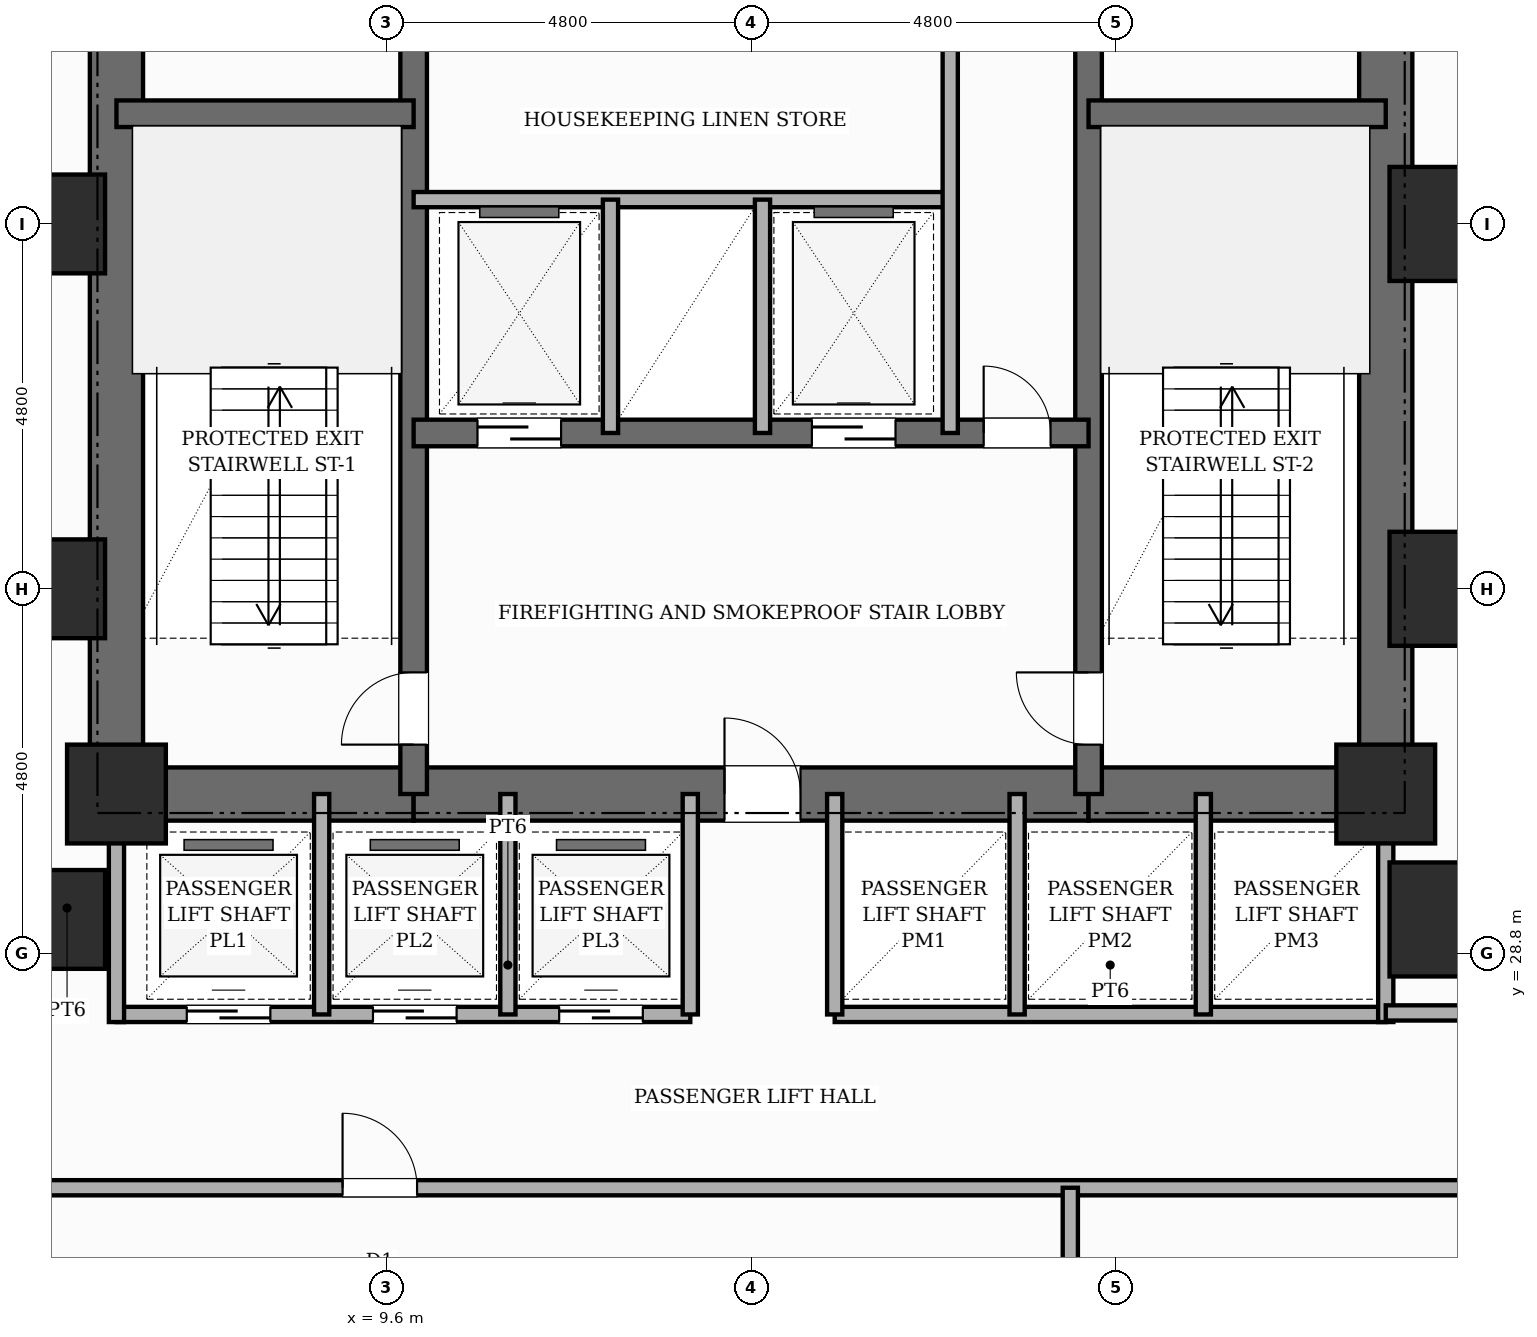
"""IFC4 building model, lengths in metres.
Left out: names, types, materials, properties, quantities, classifications, styles, units other than length and angle.
Written with IfcOpenShell. Run it as: python <this file> out.ifc"""

import sys

from ifc_helpers import new_model, si_unit, direction, frame, frame_2d, origin, origin_2d, place, context, subcontext, project, spatial, rectangle, extrude, element, fill, save


model = new_model("IFC4")
c1 = context("Model", 3, precision=1e-05, world=origin(), true_north=direction((0.0, 1.0)))
c2 = subcontext(c1, "Body", "Model", "MODEL_VIEW")
j1 = project(units=[si_unit("LENGTHUNIT", "METRE"), si_unit("PLANEANGLEUNIT", "RADIAN")], contexts=[c1])
p1 = place(None, origin())
s1 = spatial("IfcSite", under=j1, at=p1, CompositionType="ELEMENT")
p2 = place(p1, origin())
s2 = spatial("IfcBuilding", under=s1, at=p2, CompositionType="ELEMENT")
p3 = place(p2, frame((0.0, 0.0, 14.8)))
s3 = spatial("IfcBuildingStorey", under=s2, at=p3, CompositionType="ELEMENT", Elevation=14.8)
p4 = place(p3, frame((6.05, 30.55, 0.0), z_axis=(0.0, 0.0, 1.0), x_axis=(0.0, 1.0, 0.0)))
e1 = element("IfcWall", 1, at=p4, inside=s3, PredefinedType="SHEAR", context=c2, shape_type="SweptSolid", body=[
    extrude(rectangle(XDim=15.6, YDim=0.7, at=frame_2d((7.8, 0.0))), origin(), (0.0, 0.0, 1.0), 4.8),
])
p5 = place(p3, frame((22.75, 30.55, 0.0), z_axis=(0.0, 0.0, 1.0), x_axis=(0.0, 1.0, 0.0)))
e2 = element("IfcWall", 2, at=p5, inside=s3, PredefinedType="SHEAR", context=c2, shape_type="SweptSolid", body=[
    extrude(rectangle(XDim=15.6, YDim=0.7, at=frame_2d((7.8, 0.0))), origin(), (0.0, 0.0, 1.0), 4.8),
])
p6 = place(p5, frame((10.8, 0.0, 0.0)))
e3 = element("IfcOpeningElement", 3, at=p6, cuts=e2, PredefinedType="OPENING", context=c2, shape_type="SweptSolid", body=[
    extrude(rectangle(XDim=1.0, YDim=2.15, at=frame_2d((0.5, 1.075))), frame((0.0, 0.36, 0.0), z_axis=(0.0, -1.0, 0.0), x_axis=(1.0, 0.0, 0.0)), (0.0, 0.0, 1.0), 0.72),
])
p7 = place(p3, frame((6.05, 30.9, 0.0), z_axis=(0.0, 0.0, 1.0), x_axis=(1.0, 0.0, 0.0)))
e4 = element("IfcWall", 4, at=p7, inside=s3, PredefinedType="SHEAR", context=c2, shape_type="SweptSolid", body=[
    extrude(rectangle(XDim=3.91, YDim=0.7, at=frame_2d((1.955, 0.0))), origin(), (0.0, 0.0, 1.0), 4.8),
])
p8 = place(p3, frame((9.96, 30.9, 0.0), z_axis=(0.0, 0.0, 1.0), x_axis=(1.0, 0.0, 0.0)))
e5 = element("IfcWall", 5, at=p8, inside=s3, PredefinedType="SHEAR", context=c2, shape_type="SweptSolid", body=[
    extrude(rectangle(XDim=8.88, YDim=0.7, at=frame_2d((4.44, 0.0))), origin(), (0.0, 0.0, 1.0), 4.8),
])
p9 = place(p8, frame((4.09, 0.0, 0.0)))
e6 = element("IfcOpeningElement", 6, at=p9, cuts=e5, PredefinedType="OPENING", context=c2, shape_type="SweptSolid", body=[
    extrude(rectangle(XDim=1.0, YDim=2.15, at=frame_2d((0.5, 1.075))), frame((0.0, 0.36, 0.0), z_axis=(0.0, -1.0, 0.0), x_axis=(1.0, 0.0, 0.0)), (0.0, 0.0, 1.0), 0.72),
])
p10 = place(p3, frame((18.84, 30.9, 0.0), z_axis=(0.0, 0.0, 1.0), x_axis=(1.0, 0.0, 0.0)))
e7 = element("IfcWall", 7, at=p10, inside=s3, PredefinedType="SHEAR", context=c2, shape_type="SweptSolid", body=[
    extrude(rectangle(XDim=3.91, YDim=0.7, at=frame_2d((1.955, 0.0))), origin(), (0.0, 0.0, 1.0), 4.8),
])
p11 = place(p3, frame((9.96, 30.9, 0.0), z_axis=(0.0, 0.0, 1.0), x_axis=(0.0, 1.0, 0.0)))
e8 = element("IfcWall", 8, at=p11, inside=s3, PredefinedType="SHEAR", context=c2, shape_type="SweptSolid", body=[
    extrude(rectangle(XDim=14.9, YDim=0.35, at=frame_2d((7.45, 0.0))), origin(), (0.0, 0.0, 1.0), 4.8),
])
p12 = place(p11, frame((0.65, 0.0, 0.0)))
e9 = element("IfcOpeningElement", 9, at=p12, cuts=e8, PredefinedType="OPENING", context=c2, shape_type="SweptSolid", body=[
    extrude(rectangle(XDim=0.95, YDim=2.1, at=frame_2d((0.475, 1.05))), frame((0.0, 0.185, 0.0), z_axis=(0.0, -1.0, 0.0), x_axis=(1.0, 0.0, 0.0)), (0.0, 0.0, 1.0), 0.37),
])
p13 = place(p11, frame((10.45, 0.0, 0.0)))
e10 = element("IfcOpeningElement", 10, at=p13, cuts=e8, PredefinedType="OPENING", context=c2, shape_type="SweptSolid", body=[
    extrude(rectangle(XDim=1.0, YDim=2.15, at=frame_2d((0.5, 1.075))), frame((0.0, 0.185, 0.0), z_axis=(0.0, -1.0, 0.0), x_axis=(1.0, 0.0, 0.0)), (0.0, 0.0, 1.0), 0.37),
])
p14 = place(p3, frame((18.84, 30.9, 0.0), z_axis=(0.0, 0.0, 1.0), x_axis=(0.0, 1.0, 0.0)))
e11 = element("IfcWall", 11, at=p14, inside=s3, PredefinedType="SHEAR", context=c2, shape_type="SweptSolid", body=[
    extrude(rectangle(XDim=14.9, YDim=0.35, at=frame_2d((7.45, 0.0))), origin(), (0.0, 0.0, 1.0), 4.8),
])
p15 = place(p14, frame((0.65, 0.0, 0.0)))
e12 = element("IfcOpeningElement", 12, at=p15, cuts=e11, PredefinedType="OPENING", context=c2, shape_type="SweptSolid", body=[
    extrude(rectangle(XDim=0.95, YDim=2.1, at=frame_2d((0.475, 1.05))), frame((0.0, 0.185, 0.0), z_axis=(0.0, -1.0, 0.0), x_axis=(1.0, 0.0, 0.0)), (0.0, 0.0, 1.0), 0.37),
])
p16 = place(p14, frame((10.45, 0.0, 0.0)))
e13 = element("IfcOpeningElement", 13, at=p16, cuts=e11, PredefinedType="OPENING", context=c2, shape_type="SweptSolid", body=[
    extrude(rectangle(XDim=1.0, YDim=2.15, at=frame_2d((0.5, 1.075))), frame((0.0, 0.185, 0.0), z_axis=(0.0, -1.0, 0.0), x_axis=(1.0, 0.0, 0.0)), (0.0, 0.0, 1.0), 0.37),
])
for number, where, z_axis, x_axis in (
    (14, (6.05, 39.85, 0.0), (0.0, 0.0, 1.0), (1.0, 0.0, 0.0)),
    (15, (18.84, 39.85, 0.0), (0.0, 0.0, 1.0), (1.0, 0.0, 0.0)),
):
    element("IfcWall", number, at=place(p3, frame(where, z_axis=z_axis, x_axis=x_axis)), inside=s3, PredefinedType="SHEAR", context=c2, shape_type="SweptSolid", body=[
        extrude(rectangle(XDim=3.91, YDim=0.35, at=frame_2d((1.955, 0.0))), origin(), (0.0, 0.0, 1.0), 4.8),
    ])
p17 = place(p3, frame((9.96, 35.65, 0.0), z_axis=(0.0, 0.0, 1.0), x_axis=(1.0, 0.0, 0.0)))
e16 = element("IfcWall", 16, at=p17, inside=s3, PredefinedType="SHEAR", context=c2, shape_type="SweptSolid", body=[
    extrude(rectangle(XDim=8.88, YDim=0.35, at=frame_2d((4.44, 0.0))), origin(), (0.0, 0.0, 1.0), 4.8),
])
p18 = place(p17, frame((0.84, 0.0, 0.0)))
e17 = element("IfcOpeningElement", 17, at=p18, cuts=e16, PredefinedType="OPENING", context=c2, shape_type="SweptSolid", body=[
    extrude(rectangle(XDim=1.1, YDim=2.15, at=frame_2d((0.55, 1.075))), frame((0.0, 0.185, 0.0), z_axis=(0.0, -1.0, 0.0), x_axis=(1.0, 0.0, 0.0)), (0.0, 0.0, 1.0), 0.37),
])
p19 = place(p17, frame((5.24, 0.0, 0.0)))
e18 = element("IfcOpeningElement", 18, at=p19, cuts=e16, PredefinedType="OPENING", context=c2, shape_type="SweptSolid", body=[
    extrude(rectangle(XDim=1.1, YDim=2.15, at=frame_2d((0.55, 1.075))), frame((0.0, 0.185, 0.0), z_axis=(0.0, -1.0, 0.0), x_axis=(1.0, 0.0, 0.0)), (0.0, 0.0, 1.0), 0.37),
])
p20 = place(p17, frame((7.5, 0.0, 0.0)))
e19 = element("IfcOpeningElement", 19, at=p20, cuts=e16, PredefinedType="OPENING", context=c2, shape_type="SweptSolid", body=[
    extrude(rectangle(XDim=0.88, YDim=2.1, at=frame_2d((0.44, 1.05))), frame((0.0, 0.185, 0.0), z_axis=(0.0, -1.0, 0.0), x_axis=(1.0, 0.0, 0.0)), (0.0, 0.0, 1.0), 0.37),
])
for number, where, z_axis, x_axis in (
    (20, (5.25, 29.25, 0.0), (0.0, 0.0, 1.0), (1.0, 0.0, 0.0)),
    (21, (5.25, 33.6, 0.0), (0.0, 0.0, 1.0), (1.0, 0.0, 0.0)),
    (22, (5.25, 38.4, 0.0), (0.0, 0.0, 1.0), (1.0, 0.0, 0.0)),
    (23, (6.05, 30.9, 0.0), (0.0, 0.0, 1.0), (1.0, 0.0, 0.0)),
    (24, (22.75, 30.9, 0.0), (0.0, 0.0, 1.0), (1.0, 0.0, 0.0)),
):
    element("IfcColumn", number, at=place(p3, frame(where, z_axis=z_axis, x_axis=x_axis)), inside=s3, PredefinedType="COLUMN", context=c2, shape_type="SweptSolid", body=[
        extrude(rectangle(XDim=1.3, YDim=1.3, at=origin_2d()), origin(), (0.0, 0.0, 1.0), 4.8),
    ])
for number, where, z_axis, x_axis in (
    (25, (23.55, 29.25, 0.0), (0.0, 0.0, 1.0), (1.0, 0.0, 0.0)),
    (26, (23.55, 33.6, 0.0), (0.0, 0.0, 1.0), (1.0, 0.0, 0.0)),
    (27, (23.55, 38.4, 0.0), (0.0, 0.0, 1.0), (1.0, 0.0, 0.0)),
):
    element("IfcColumn", number, at=place(p3, frame(where, z_axis=z_axis, x_axis=x_axis)), inside=s3, PredefinedType="USERDEFINED", context=c2, shape_type="SweptSolid", body=[
        extrude(rectangle(XDim=1.5, YDim=1.5, at=origin_2d()), origin(), (0.0, 0.0, 1.0), 4.8),
    ])
p21 = place(p3, frame((9.96, 38.72, 0.0), z_axis=(0.0, 0.0, 1.0), x_axis=(1.0, 0.0, 0.0)))
e28 = element("IfcWall", 28, at=p21, inside=s3, PredefinedType="POLYGONAL", context=c2, shape_type="SweptSolid", body=[
    extrude(rectangle(XDim=7.06, YDim=0.2, at=frame_2d((3.53, 0.0))), origin(), (0.0, 0.0, 1.0), 4.4),
])
for number, where, z_axis, x_axis in (
    (29, (12.55, 35.65, 0.0), (0.0, 0.0, 1.0), (0.0, 1.0, 0.0)),
    (30, (14.55, 35.65, 0.0), (0.0, 0.0, 1.0), (0.0, 1.0, 0.0)),
):
    element("IfcWall", number, at=place(p3, frame(where, z_axis=z_axis, x_axis=x_axis)), inside=s3, PredefinedType="POLYGONAL", context=c2, shape_type="SweptSolid", body=[
        extrude(rectangle(XDim=3.07, YDim=0.2, at=frame_2d((1.535, 0.0))), origin(), (0.0, 0.0, 1.0), 4.4),
    ])
p22 = place(p3, frame((17.02, 35.65, 0.0), z_axis=(0.0, 0.0, 1.0), x_axis=(0.0, 1.0, 0.0)))
e31 = element("IfcWall", 31, at=p22, inside=s3, PredefinedType="POLYGONAL", context=c2, shape_type="SweptSolid", body=[
    extrude(rectangle(XDim=5.15, YDim=0.2, at=frame_2d((2.575, 0.0))), origin(), (0.0, 0.0, 1.0), 4.4),
])
p23 = place(p3, frame((6.05, 28.0, 0.0), z_axis=(0.0, 0.0, 1.0), x_axis=(1.0, 0.0, 0.0)))
e32 = element("IfcWall", 32, at=p23, inside=s3, PredefinedType="POLYGONAL", context=c2, shape_type="SweptSolid", body=[
    extrude(rectangle(XDim=7.55, YDim=0.2, at=frame_2d((3.775, 0.0))), origin(), (0.0, 0.0, 1.0), 4.4),
])
p24 = place(p23, frame((0.925, 0.0, 0.0)))
e33 = element("IfcOpeningElement", 33, at=p24, cuts=e32, PredefinedType="OPENING", context=c2, shape_type="SweptSolid", body=[
    extrude(rectangle(XDim=1.1, YDim=2.15, at=frame_2d((0.55, 1.075))), frame((0.0, 0.11, 0.0), z_axis=(0.0, -1.0, 0.0), x_axis=(1.0, 0.0, 0.0)), (0.0, 0.0, 1.0), 0.22),
])
p25 = place(p23, frame((3.375, 0.0, 0.0)))
e34 = element("IfcOpeningElement", 34, at=p25, cuts=e32, PredefinedType="OPENING", context=c2, shape_type="SweptSolid", body=[
    extrude(rectangle(XDim=1.1, YDim=2.15, at=frame_2d((0.55, 1.075))), frame((0.0, 0.11, 0.0), z_axis=(0.0, -1.0, 0.0), x_axis=(1.0, 0.0, 0.0)), (0.0, 0.0, 1.0), 0.22),
])
p26 = place(p23, frame((5.825, 0.0, 0.0)))
e35 = element("IfcOpeningElement", 35, at=p26, cuts=e32, PredefinedType="OPENING", context=c2, shape_type="SweptSolid", body=[
    extrude(rectangle(XDim=1.1, YDim=2.15, at=frame_2d((0.55, 1.075))), frame((0.0, 0.11, 0.0), z_axis=(0.0, -1.0, 0.0), x_axis=(1.0, 0.0, 0.0)), (0.0, 0.0, 1.0), 0.22),
])
p27 = place(p3, frame((15.5, 28.0, 0.0), z_axis=(0.0, 0.0, 1.0), x_axis=(1.0, 0.0, 0.0)))
e36 = element("IfcWall", 36, at=p27, inside=s3, PredefinedType="POLYGONAL", context=c2, shape_type="SweptSolid", body=[
    extrude(rectangle(XDim=7.25, YDim=0.2, at=frame_2d((3.625, 0.0))), origin(), (0.0, 0.0, 1.0), 4.4),
])
for number, where, z_axis, x_axis in (
    (37, (6.05, 27.9, 0.0), (0.0, 0.0, 1.0), (0.0, 1.0, 0.0)),
    (38, (22.75, 27.9, 0.0), (0.0, 0.0, 1.0), (0.0, 1.0, 0.0)),
):
    element("IfcWall", number, at=place(p3, frame(where, z_axis=z_axis, x_axis=x_axis)), inside=s3, PredefinedType="POLYGONAL", context=c2, shape_type="SweptSolid", body=[
        extrude(rectangle(XDim=3.0, YDim=0.2, at=frame_2d((1.5, 0.0))), origin(), (0.0, 0.0, 1.0), 4.4),
    ])
for number, where, z_axis, x_axis in (
    (39, (13.6, 28.0, 0.0), (0.0, 0.0, 1.0), (0.0, 1.0, 0.0)),
    (40, (15.5, 28.0, 0.0), (0.0, 0.0, 1.0), (0.0, 1.0, 0.0)),
    (41, (8.75, 28.0, 0.0), (0.0, 0.0, 1.0), (0.0, 1.0, 0.0)),
    (42, (11.2, 28.0, 0.0), (0.0, 0.0, 1.0), (0.0, 1.0, 0.0)),
    (43, (17.9, 28.0, 0.0), (0.0, 0.0, 1.0), (0.0, 1.0, 0.0)),
    (44, (20.35, 28.0, 0.0), (0.0, 0.0, 1.0), (0.0, 1.0, 0.0)),
):
    element("IfcWall", number, at=place(p3, frame(where, z_axis=z_axis, x_axis=x_axis)), inside=s3, PredefinedType="POLYGONAL", context=c2, shape_type="SweptSolid", body=[
        extrude(rectangle(XDim=2.9, YDim=0.2, at=frame_2d((1.45, 0.0))), origin(), (0.0, 0.0, 1.0), 4.4),
    ])
p28 = place(p3, frame((0.36, 25.72, 0.0), z_axis=(0.0, 0.0, 1.0), x_axis=(1.0, 0.0, 0.0)))
e45 = element("IfcWall", 45, at=p28, inside=s3, PredefinedType="PARTITIONING", context=c2, shape_type="SweptSolid", body=[
    extrude(rectangle(XDim=56.88, YDim=0.2, at=frame_2d((28.44, 0.0))), origin(), (0.0, 0.0, 1.0), 4.4),
])
p29 = place(p28, frame((8.665, 0.0, 0.0)))
e46 = element("IfcOpeningElement", 46, at=p29, cuts=e45, PredefinedType="OPENING", context=c2, shape_type="SweptSolid", body=[
    extrude(rectangle(XDim=0.98, YDim=2.18, at=frame_2d((0.49, 1.09))), frame((0.0, 0.11, 0.0), z_axis=(0.0, -1.0, 0.0), x_axis=(1.0, 0.0, 0.0)), (0.0, 0.0, 1.0), 0.22),
])
p30 = place(p28, frame((27.34, 0.0, 0.0)))
e47 = element("IfcOpeningElement", 47, at=p30, cuts=e45, PredefinedType="OPENING", context=c2, shape_type="SweptSolid", body=[
    extrude(rectangle(XDim=0.98, YDim=2.18, at=frame_2d((0.49, 1.09))), frame((0.0, 0.11, 0.0), z_axis=(0.0, -1.0, 0.0), x_axis=(1.0, 0.0, 0.0)), (0.0, 0.0, 1.0), 0.22),
])
p31 = place(p28, frame((46.615, 0.0, 0.0)))
e48 = element("IfcOpeningElement", 48, at=p31, cuts=e45, PredefinedType="OPENING", context=c2, shape_type="SweptSolid", body=[
    extrude(rectangle(XDim=0.98, YDim=2.18, at=frame_2d((0.49, 1.09))), frame((0.0, 0.11, 0.0), z_axis=(0.0, -1.0, 0.0), x_axis=(1.0, 0.0, 0.0)), (0.0, 0.0, 1.0), 0.22),
])
p32 = place(p3, frame((22.75, 28.02, 0.0), z_axis=(0.0, 0.0, 1.0), x_axis=(1.0, 0.0, 0.0)))
e49 = element("IfcWall", 49, at=p32, inside=s3, PredefinedType="PARTITIONING", context=c2, shape_type="SweptSolid", body=[
    extrude(rectangle(XDim=19.03, YDim=0.2, at=frame_2d((9.515, 0.0))), origin(), (0.0, 0.0, 1.0), 4.4),
])
p33 = place(p32, frame((4.65, 0.0, 0.0)))
e50 = element("IfcOpeningElement", 50, at=p33, cuts=e49, PredefinedType="OPENING", context=c2, shape_type="SweptSolid", body=[
    extrude(rectangle(XDim=0.95, YDim=2.15, at=frame_2d((0.475, 1.075))), frame((0.0, 0.11, 0.0), z_axis=(0.0, -1.0, 0.0), x_axis=(1.0, 0.0, 0.0)), (0.0, 0.0, 1.0), 0.22),
])
p34 = place(p32, frame((12.6, 0.0, 0.0)))
e51 = element("IfcOpeningElement", 51, at=p34, cuts=e49, PredefinedType="OPENING", context=c2, shape_type="SweptSolid", body=[
    extrude(rectangle(XDim=0.86, YDim=2.1, at=frame_2d((0.43, 1.05))), frame((0.0, 0.11, 0.0), z_axis=(0.0, -1.0, 0.0), x_axis=(1.0, 0.0, 0.0)), (0.0, 0.0, 1.0), 0.22),
])
p35 = place(p32, frame((16.2, 0.0, 0.0)))
e52 = element("IfcOpeningElement", 52, at=p35, cuts=e49, PredefinedType="OPENING", context=c2, shape_type="SweptSolid", body=[
    extrude(rectangle(XDim=0.86, YDim=2.1, at=frame_2d((0.43, 1.05))), frame((0.0, 0.11, 0.0), z_axis=(0.0, -1.0, 0.0), x_axis=(1.0, 0.0, 0.0)), (0.0, 0.0, 1.0), 0.22),
])
p36 = place(p3, frame((18.6, 9.96, 0.0), z_axis=(0.0, 0.0, 1.0), x_axis=(0.0, 1.0, 0.0)))
e53 = element("IfcWall", 53, at=p36, inside=s3, PredefinedType="SOLIDWALL", context=c2, shape_type="SweptSolid", body=[
    extrude(rectangle(XDim=15.76, YDim=0.2, at=frame_2d((7.88, 0.0))), origin(), (0.0, 0.0, 1.0), 4.4),
])
p37 = place(p12, origin())
e54 = element("IfcDoor", 54, at=p37, inside=s3, OperationType="SINGLE_SWING_LEFT", PredefinedType="DOOR", context=c2, shape_type="SweptSolid", body=[
    extrude(rectangle(XDim=0.95, YDim=2.1, at=frame_2d((0.475, 1.05))), frame((0.0, 0.025, 0.0), z_axis=(0.0, -1.0, 0.0), x_axis=(1.0, 0.0, 0.0)), (0.0, 0.0, 1.0), 0.05),
])
fill(e9, e54)
p38 = place(p15, origin())
e55 = element("IfcDoor", 55, at=p38, inside=s3, OperationType="SINGLE_SWING_RIGHT", PredefinedType="DOOR", context=c2, shape_type="SweptSolid", body=[
    extrude(rectangle(XDim=0.95, YDim=2.1, at=frame_2d((0.475, 1.05))), frame((0.0, 0.025, 0.0), z_axis=(0.0, -1.0, 0.0), x_axis=(1.0, 0.0, 0.0)), (0.0, 0.0, 1.0), 0.05),
])
fill(e12, e55)
p39 = place(p9, origin())
e56 = element("IfcDoor", 56, at=p39, inside=s3, OperationType="SINGLE_SWING_LEFT", PredefinedType="DOOR", context=c2, shape_type="SweptSolid", body=[
    extrude(rectangle(XDim=1.0, YDim=2.15, at=frame_2d((0.5, 1.075))), frame((0.0, 0.025, 0.0), z_axis=(0.0, -1.0, 0.0), x_axis=(1.0, 0.0, 0.0)), (0.0, 0.0, 1.0), 0.05),
])
fill(e6, e56)
p40 = place(p18, origin())
e57 = element("IfcDoor", 57, at=p40, inside=s3, OperationType="SLIDING_TO_LEFT", PredefinedType="DOOR", context=c2, shape_type="SweptSolid", body=[
    extrude(rectangle(XDim=1.1, YDim=2.15, at=frame_2d((0.55, 1.075))), frame((0.0, 0.025, 0.0), z_axis=(0.0, -1.0, 0.0), x_axis=(1.0, 0.0, 0.0)), (0.0, 0.0, 1.0), 0.05),
])
fill(e17, e57)
p41 = place(p19, origin())
e58 = element("IfcDoor", 58, at=p41, inside=s3, OperationType="SLIDING_TO_RIGHT", PredefinedType="DOOR", context=c2, shape_type="SweptSolid", body=[
    extrude(rectangle(XDim=1.1, YDim=2.15, at=frame_2d((0.55, 1.075))), frame((0.0, 0.025, 0.0), z_axis=(0.0, -1.0, 0.0), x_axis=(1.0, 0.0, 0.0)), (0.0, 0.0, 1.0), 0.05),
])
fill(e18, e58)
p42 = place(p20, origin())
e59 = element("IfcDoor", 59, at=p42, inside=s3, OperationType="SINGLE_SWING_LEFT", PredefinedType="DOOR", context=c2, shape_type="SweptSolid", body=[
    extrude(rectangle(XDim=0.88, YDim=2.1, at=frame_2d((0.44, 1.05))), frame((0.0, 0.025, 0.0), z_axis=(0.0, -1.0, 0.0), x_axis=(1.0, 0.0, 0.0)), (0.0, 0.0, 1.0), 0.05),
])
fill(e19, e59)
p43 = place(p24, origin())
e60 = element("IfcDoor", 60, at=p43, inside=s3, OperationType="SLIDING_TO_LEFT", PredefinedType="DOOR", context=c2, shape_type="SweptSolid", body=[
    extrude(rectangle(XDim=1.1, YDim=2.15, at=frame_2d((0.55, 1.075))), frame((0.0, 0.025, 0.0), z_axis=(0.0, -1.0, 0.0), x_axis=(1.0, 0.0, 0.0)), (0.0, 0.0, 1.0), 0.05),
])
fill(e33, e60)
p44 = place(p25, origin())
e61 = element("IfcDoor", 61, at=p44, inside=s3, OperationType="SLIDING_TO_RIGHT", PredefinedType="DOOR", context=c2, shape_type="SweptSolid", body=[
    extrude(rectangle(XDim=1.1, YDim=2.15, at=frame_2d((0.55, 1.075))), frame((0.0, 0.025, 0.0), z_axis=(0.0, -1.0, 0.0), x_axis=(1.0, 0.0, 0.0)), (0.0, 0.0, 1.0), 0.05),
])
fill(e34, e61)
p45 = place(p26, origin())
e62 = element("IfcDoor", 62, at=p45, inside=s3, OperationType="SLIDING_TO_LEFT", PredefinedType="DOOR", context=c2, shape_type="SweptSolid", body=[
    extrude(rectangle(XDim=1.1, YDim=2.15, at=frame_2d((0.55, 1.075))), frame((0.0, 0.025, 0.0), z_axis=(0.0, -1.0, 0.0), x_axis=(1.0, 0.0, 0.0)), (0.0, 0.0, 1.0), 0.05),
])
fill(e35, e62)
p46 = place(p29, origin())
e63 = element("IfcDoor", 63, at=p46, inside=s3, OperationType="SINGLE_SWING_LEFT", PredefinedType="DOOR", context=c2, shape_type="SweptSolid", body=[
    extrude(rectangle(XDim=0.98, YDim=2.18, at=frame_2d((0.49, 1.09))), frame((0.0, 0.025, 0.0), z_axis=(0.0, -1.0, 0.0), x_axis=(1.0, 0.0, 0.0)), (0.0, 0.0, 1.0), 0.05),
])
fill(e46, e63)
save(model, sys.argv[1])
